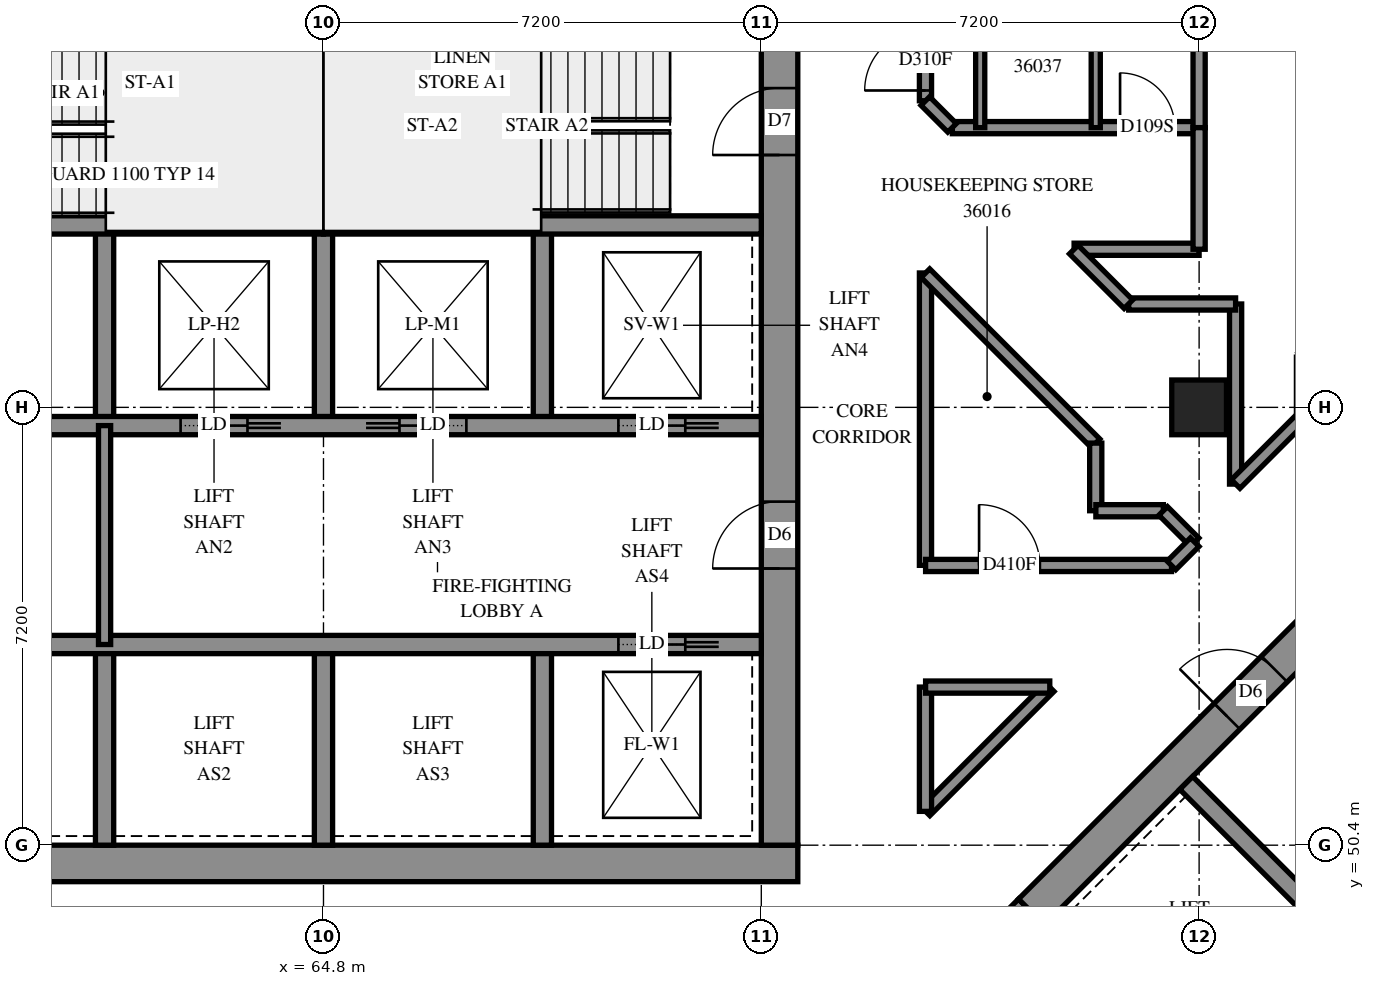
"""IFC4 building model, lengths in metres.
Left out: names, types, materials, properties, quantities, classifications, styles, units other than length and angle.
Written with IfcOpenShell. Run it as: python <this file> out.ifc"""

import sys

from ifc_helpers import new_model, si_unit, direction, frame, frame_2d, origin, origin_2d, place, context, subcontext, project, spatial, rectangle, extrude, element, fill, save


model = new_model("IFC4")
c1 = context("Model", 3, precision=1e-05, world=origin(), true_north=direction((0.0, 1.0)))
c2 = subcontext(c1, "Body", "Model", "MODEL_VIEW")
j1 = project(units=[si_unit("LENGTHUNIT", "METRE"), si_unit("PLANEANGLEUNIT", "RADIAN")], contexts=[c1])
p1 = place(None, origin())
s1 = spatial("IfcSite", under=j1, at=p1, CompositionType="ELEMENT")
p2 = place(p1, origin())
s2 = spatial("IfcBuilding", under=s1, at=p2, CompositionType="ELEMENT")
p3 = place(p2, frame((0.0, 0.0, 135.4)))
s3 = spatial("IfcBuildingStorey", under=s2, at=p3, CompositionType="ELEMENT", Elevation=135.4)
p4 = place(p3, frame((79.2, 57.6, 0.0), z_axis=(0.0, 0.0, 1.0), x_axis=(1.0, 0.0, 0.0)))
e1 = element("IfcColumn", 1, at=p4, inside=s3, PredefinedType="COLUMN", context=c2, shape_type="SweptSolid", body=[
    extrude(rectangle(XDim=0.9, YDim=0.9, at=origin_2d()), origin(), (0.0, 0.0, 1.0), 3.1),
])
p5 = place(p3, frame((57.0, 50.1, -0.3), z_axis=(0.0, 0.0, 1.0), x_axis=(1.0, 0.0, 0.0)))
e2 = element("IfcWall", 2, at=p5, inside=s3, PredefinedType="SHEAR", context=c2, shape_type="SweptSolid", body=[
    extrude(rectangle(XDim=15.6, YDim=0.6, at=frame_2d((7.8, 0.0))), origin(), (0.0, 0.0, 1.0), 2.7),
])
p6 = place(p3, frame((72.3, 50.4, -0.3), z_axis=(0.0, 0.0, 1.0), x_axis=(0.0, 1.0, 0.0)))
e3 = element("IfcWall", 3, at=p6, inside=s3, PredefinedType="SHEAR", context=c2, shape_type="SweptSolid", body=[
    extrude(rectangle(XDim=14.4, YDim=0.6, at=frame_2d((7.2, 0.0))), origin(), (0.0, 0.0, 1.0), 2.7),
])
p7 = place(p6, frame((4.55, 0.0, 0.3)))
e4 = element("IfcOpeningElement", 4, at=p7, cuts=e3, PredefinedType="OPENING", context=c2, shape_type="SweptSolid", body=[
    extrude(rectangle(XDim=1.1, YDim=2.1, at=frame_2d((0.55, 1.05))), frame((0.0, 0.31, 0.0), z_axis=(0.0, -1.0, 0.0), x_axis=(1.0, 0.0, 0.0)), (0.0, 0.0, 1.0), 0.62),
])
p8 = place(p6, frame((11.35, 0.0, 0.3)))
e5 = element("IfcOpeningElement", 5, at=p8, cuts=e3, PredefinedType="OPENING", context=c2, shape_type="SweptSolid", body=[
    extrude(rectangle(XDim=1.1, YDim=2.1, at=frame_2d((0.55, 1.05))), frame((0.0, 0.31, 0.0), z_axis=(0.0, -1.0, 0.0), x_axis=(1.0, 0.0, 0.0)), (0.0, 0.0, 1.0), 0.62),
])
for number, where, z_axis, x_axis in (
    (6, (61.2, 50.4, 0.0), (0.0, 0.0, 1.0), (0.0, 1.0, 0.0)),
    (7, (61.2, 57.3, 0.0), (0.0, 0.0, 1.0), (0.0, 1.0, 0.0)),
    (8, (64.8, 50.4, 0.0), (0.0, 0.0, 1.0), (0.0, 1.0, 0.0)),
    (9, (64.8, 57.3, 0.0), (0.0, 0.0, 1.0), (0.0, 1.0, 0.0)),
    (10, (68.4, 50.4, 0.0), (0.0, 0.0, 1.0), (0.0, 1.0, 0.0)),
    (11, (68.4, 57.3, 0.0), (0.0, 0.0, 1.0), (0.0, 1.0, 0.0)),
):
    element("IfcWall", number, at=place(p3, frame(where, z_axis=z_axis, x_axis=x_axis)), inside=s3, PredefinedType="SOLIDWALL", context=c2, shape_type="SweptSolid", body=[
        extrude(rectangle(XDim=3.3, YDim=0.3, at=frame_2d((1.65, 0.0))), origin(), (0.0, 0.0, 1.0), 3.1),
    ])
p9 = place(p3, frame((57.6, 53.7, 0.0), z_axis=(0.0, 0.0, 1.0), x_axis=(1.0, 0.0, 0.0)))
e12 = element("IfcWall", 12, at=p9, inside=s3, PredefinedType="SOLIDWALL", context=c2, shape_type="SweptSolid", body=[
    extrude(rectangle(XDim=14.4, YDim=0.3, at=frame_2d((7.2, 0.0))), origin(), (0.0, 0.0, 1.0), 3.1),
])
p10 = place(p9, frame((12.05, 0.0, 0.0)))
e13 = element("IfcOpeningElement", 13, at=p10, cuts=e12, PredefinedType="OPENING", context=c2, shape_type="SweptSolid", body=[
    extrude(rectangle(XDim=1.1, YDim=2.1, at=frame_2d((0.55, 1.05))), frame((0.0, 0.16, 0.0), z_axis=(0.0, -1.0, 0.0), x_axis=(1.0, 0.0, 0.0)), (0.0, 0.0, 1.0), 0.32),
])
p11 = place(p3, frame((57.6, 57.3, 0.0), z_axis=(0.0, 0.0, 1.0), x_axis=(1.0, 0.0, 0.0)))
e14 = element("IfcWall", 14, at=p11, inside=s3, PredefinedType="SOLIDWALL", context=c2, shape_type="SweptSolid", body=[
    extrude(rectangle(XDim=14.4, YDim=0.3, at=frame_2d((7.2, 0.0))), origin(), (0.0, 0.0, 1.0), 3.1),
])
p12 = place(p11, frame((1.25, 0.0, 0.0)))
e15 = element("IfcOpeningElement", 15, at=p12, cuts=e14, PredefinedType="OPENING", context=c2, shape_type="SweptSolid", body=[
    extrude(rectangle(XDim=1.1, YDim=2.1, at=frame_2d((0.55, 1.05))), frame((0.0, 0.16, 0.0), z_axis=(0.0, -1.0, 0.0), x_axis=(1.0, 0.0, 0.0)), (0.0, 0.0, 1.0), 0.32),
])
p13 = place(p11, frame((4.85, 0.0, 0.0)))
e16 = element("IfcOpeningElement", 16, at=p13, cuts=e14, PredefinedType="OPENING", context=c2, shape_type="SweptSolid", body=[
    extrude(rectangle(XDim=1.1, YDim=2.1, at=frame_2d((0.55, 1.05))), frame((0.0, 0.16, 0.0), z_axis=(0.0, -1.0, 0.0), x_axis=(1.0, 0.0, 0.0)), (0.0, 0.0, 1.0), 0.32),
])
p14 = place(p11, frame((8.45, 0.0, 0.0)))
e17 = element("IfcOpeningElement", 17, at=p14, cuts=e14, PredefinedType="OPENING", context=c2, shape_type="SweptSolid", body=[
    extrude(rectangle(XDim=1.1, YDim=2.1, at=frame_2d((0.55, 1.05))), frame((0.0, 0.16, 0.0), z_axis=(0.0, -1.0, 0.0), x_axis=(1.0, 0.0, 0.0)), (0.0, 0.0, 1.0), 0.32),
])
p15 = place(p11, frame((12.05, 0.0, 0.0)))
e18 = element("IfcOpeningElement", 18, at=p15, cuts=e14, PredefinedType="OPENING", context=c2, shape_type="SweptSolid", body=[
    extrude(rectangle(XDim=1.1, YDim=2.1, at=frame_2d((0.55, 1.05))), frame((0.0, 0.16, 0.0), z_axis=(0.0, -1.0, 0.0), x_axis=(1.0, 0.0, 0.0)), (0.0, 0.0, 1.0), 0.32),
])
for number, where, z_axis, x_axis in (
    (19, (57.6, 60.6, 0.0), (0.0, 0.0, 1.0), (1.0, 0.0, 0.0)),
    (20, (64.8, 60.6, 0.0), (0.0, 0.0, 1.0), (1.0, 0.0, 0.0)),
):
    element("IfcWall", number, at=place(p3, frame(where, z_axis=z_axis, x_axis=x_axis)), inside=s3, PredefinedType="SOLIDWALL", context=c2, shape_type="SweptSolid", body=[
        extrude(rectangle(XDim=7.2, YDim=0.3, at=frame_2d((3.6, 0.0))), origin(), (0.0, 0.0, 1.0), 3.1),
    ])
p16 = place(p3, frame((64.8, 60.6, 0.0), z_axis=(0.0, 0.0, 1.0), x_axis=(0.0, 1.0, 0.0)))
e21 = element("IfcWall", 21, at=p16, inside=s3, PredefinedType="SOLIDWALL", context=c2, shape_type="SweptSolid", body=[
    extrude(rectangle(XDim=4.2, YDim=0.3, at=frame_2d((2.1, 0.0))), origin(), (0.0, 0.0, 1.0), 3.1),
])
p17 = place(p3, frame((76.018, 49.302, -0.3), z_axis=(0.0, 0.0, 1.0), x_axis=(0.7071067812, -0.7071067812, 0.0)))
e22 = element("IfcWall", 22, at=p17, inside=s3, PredefinedType="SHEAR", context=c2, shape_type="SweptSolid", body=[
    extrude(rectangle(XDim=15.6, YDim=0.6, at=frame_2d((7.8, 0.0))), origin(), (0.0, 0.0, 1.0), 2.7),
])
p18 = place(p3, frame((76.442, 49.302, -0.3), z_axis=(0.0, 0.0, 1.0), x_axis=(0.7071067812, 0.7071067812, 0.0)))
e23 = element("IfcWall", 23, at=p18, inside=s3, PredefinedType="SHEAR", context=c2, shape_type="SweptSolid", body=[
    extrude(rectangle(XDim=14.4, YDim=0.6, at=frame_2d((7.2, 0.0))), origin(), (0.0, 0.0, 1.0), 2.7),
])
p19 = place(p18, frame((4.55, 0.0, 0.3)))
e24 = element("IfcOpeningElement", 24, at=p19, cuts=e23, PredefinedType="OPENING", context=c2, shape_type="SweptSolid", body=[
    extrude(rectangle(XDim=1.1, YDim=2.1, at=frame_2d((0.55, 1.05))), frame((0.0, 0.31, 0.0), z_axis=(0.0, -1.0, 0.0), x_axis=(1.0, 0.0, 0.0)), (0.0, 0.0, 1.0), 0.62),
])
p20 = place(p18, frame((11.35, 0.0, 0.3)))
e25 = element("IfcOpeningElement", 25, at=p20, cuts=e23, PredefinedType="OPENING", context=c2, shape_type="SweptSolid", body=[
    extrude(rectangle(XDim=1.1, YDim=2.1, at=frame_2d((0.55, 1.05))), frame((0.0, 0.31, 0.0), z_axis=(0.0, -1.0, 0.0), x_axis=(1.0, 0.0, 0.0)), (0.0, 0.0, 1.0), 0.62),
])
p21 = place(p3, frame((78.988, 51.423, 0.0), z_axis=(0.0, 0.0, 1.0), x_axis=(0.7071067812, -0.7071067812, 0.0)))
e26 = element("IfcWall", 26, at=p21, inside=s3, PredefinedType="SOLIDWALL", context=c2, shape_type="SweptSolid", body=[
    extrude(rectangle(XDim=14.4, YDim=0.3, at=frame_2d((7.2, 0.0))), origin(), (0.0, 0.0, 1.0), 3.1),
])
p22 = place(p21, frame((12.05, 0.0, 0.0)))
e27 = element("IfcOpeningElement", 27, at=p22, cuts=e26, PredefinedType="OPENING", context=c2, shape_type="SweptSolid", body=[
    extrude(rectangle(XDim=1.1, YDim=2.1, at=frame_2d((0.55, 1.05))), frame((0.0, 0.16, 0.0), z_axis=(0.0, -1.0, 0.0), x_axis=(1.0, 0.0, 0.0)), (0.0, 0.0, 1.0), 0.32),
])
p23 = place(p3, frame((61.2, 53.7, 0.0), z_axis=(0.0, 0.0, 1.0), x_axis=(0.0, 1.0, 0.0)))
e28 = element("IfcWall", 28, at=p23, inside=s3, PredefinedType="PARTITIONING", context=c2, shape_type="SweptSolid", body=[
    extrude(rectangle(XDim=3.6, YDim=0.2, at=frame_2d((1.8, 0.0))), origin(), (0.0, 0.0, 1.0), 3.1),
])
p24 = place(p3, frame((74.7, 62.642, 0.0), z_axis=(0.0, 0.0, 1.0), x_axis=(0.0, 1.0, 0.0)))
e29 = element("IfcWall", 29, at=p24, inside=s3, PredefinedType="PARTITIONING", context=c2, shape_type="SweptSolid", body=[
    extrude(rectangle(XDim=4.858, YDim=0.2, at=frame_2d((2.429, 0.0))), origin(), (0.0, 0.0, 1.0), 3.1),
])
p25 = place(p24, frame((0.169, 0.0, 0.0)))
e30 = element("IfcOpeningElement", 30, at=p25, cuts=e29, PredefinedType="OPENING", context=c2, shape_type="SweptSolid", body=[
    extrude(rectangle(XDim=1.0, YDim=2.1, at=frame_2d((0.5, 1.05))), frame((0.0, 0.11, 0.0), z_axis=(0.0, -1.0, 0.0), x_axis=(1.0, 0.0, 0.0)), (0.0, 0.0, 1.0), 0.22),
])
p26 = place(p3, frame((74.7, 55.002, 0.0), z_axis=(0.0, 0.0, 1.0), x_axis=(0.0, 1.0, 0.0)))
e31 = element("IfcWall", 31, at=p26, inside=s3, PredefinedType="PARTITIONING", context=c2, shape_type="SweptSolid", body=[
    extrude(rectangle(XDim=4.808, YDim=0.2, at=frame_2d((2.404, 0.0))), origin(), (0.0, 0.0, 1.0), 3.1),
])
p27 = place(p3, frame((75.142, 62.2, 0.0), z_axis=(0.0, 0.0, 1.0), x_axis=(1.0, 0.0, 0.0)))
e32 = element("IfcWall", 32, at=p27, inside=s3, PredefinedType="PARTITIONING", context=c2, shape_type="SweptSolid", body=[
    extrude(rectangle(XDim=4.058, YDim=0.2, at=frame_2d((2.029, 0.0))), origin(), (0.0, 0.0, 1.0), 3.1),
])
p28 = place(p27, frame((2.758, 0.0, 0.0)))
e33 = element("IfcOpeningElement", 33, at=p28, cuts=e32, PredefinedType="OPENING", context=c2, shape_type="SweptSolid", body=[
    extrude(rectangle(XDim=0.9, YDim=2.1, at=frame_2d((0.45, 1.05))), frame((0.0, 0.11, 0.0), z_axis=(0.0, -1.0, 0.0), x_axis=(1.0, 0.0, 0.0)), (0.0, 0.0, 1.0), 0.22),
])
p29 = place(p3, frame((74.702, 55.0, 0.0), z_axis=(0.0, 0.0, 1.0), x_axis=(1.0, 0.0, 0.0)))
e34 = element("IfcWall", 34, at=p29, inside=s3, PredefinedType="PARTITIONING", context=c2, shape_type="SweptSolid", body=[
    extrude(rectangle(XDim=4.044, YDim=0.2, at=frame_2d((2.022, 0.0))), origin(), (0.0, 0.0, 1.0), 3.1),
])
p30 = place(p29, frame((0.879, 0.0, 0.0)))
e35 = element("IfcOpeningElement", 35, at=p30, cuts=e34, PredefinedType="OPENING", context=c2, shape_type="SweptSolid", body=[
    extrude(rectangle(XDim=1.0, YDim=2.1, at=frame_2d((0.5, 1.05))), frame((0.0, 0.11, 0.0), z_axis=(0.0, -1.0, 0.0), x_axis=(1.0, 0.0, 0.0)), (0.0, 0.0, 1.0), 0.22),
])
p31 = place(p3, frame((74.699, 59.807, 0.0), z_axis=(0.0, 0.0, 1.0), x_axis=(0.7071067812, -0.7071067812, 0.0)))
e36 = element("IfcWall", 36, at=p31, inside=s3, PredefinedType="PARTITIONING", context=c2, shape_type="SweptSolid", body=[
    extrude(rectangle(XDim=3.957, YDim=0.2, at=frame_2d((1.978, 0.0))), origin(), (0.0, 0.0, 1.0), 3.1),
])
p32 = place(p3, frame((79.8, 56.338, 0.0), z_axis=(0.0, 0.0, 1.0), x_axis=(0.0, 1.0, 0.0)))
e37 = element("IfcWall", 37, at=p32, inside=s3, PredefinedType="PARTITIONING", context=c2, shape_type="SweptSolid", body=[
    extrude(rectangle(XDim=2.962, YDim=0.2, at=frame_2d((1.481, 0.0))), origin(), (0.0, 0.0, 1.0), 3.1),
])
p33 = place(p3, frame((74.701, 50.957, 0.0), z_axis=(0.0, 0.0, 1.0), x_axis=(0.7071067812, 0.7071067812, 0.0)))
e38 = element("IfcWall", 38, at=p33, inside=s3, PredefinedType="PARTITIONING", context=c2, shape_type="SweptSolid", body=[
    extrude(rectangle(XDim=2.888, YDim=0.2, at=frame_2d((1.444, 0.0))), origin(), (0.0, 0.0, 1.0), 3.1),
])
for number, where, z_axis, x_axis in (
    (39, (75.6, 62.2, 0.0), (0.0, 0.0, 1.0), (0.0, 1.0, 0.0)),
    (40, (77.5, 62.2, 0.0), (0.0, 0.0, 1.0), (0.0, 1.0, 0.0)),
):
    element("IfcWall", number, at=place(p3, frame(where, z_axis=z_axis, x_axis=x_axis)), inside=s3, PredefinedType="PARTITIONING", context=c2, shape_type="SweptSolid", body=[
        extrude(rectangle(XDim=2.4, YDim=0.15, at=frame_2d((1.2, 0.0))), origin(), (0.0, 0.0, 1.0), 3.1),
    ])
p34 = place(p3, frame((79.2, 62.2, 0.0), z_axis=(0.0, 0.0, 1.0), x_axis=(0.0, 1.0, 0.0)))
e41 = element("IfcWall", 41, at=p34, inside=s3, PredefinedType="PARTITIONING", context=c2, shape_type="SweptSolid", body=[
    extrude(rectangle(XDim=2.15, YDim=0.2, at=frame_2d((1.075, 0.0))), origin(), (0.0, 0.0, 1.0), 3.1),
])
p35 = place(p3, frame((77.144, 60.2, 0.0), z_axis=(0.0, 0.0, 1.0), x_axis=(1.0, 0.0, 0.0)))
e42 = element("IfcWall", 42, at=p35, inside=s3, PredefinedType="PARTITIONING", context=c2, shape_type="SweptSolid", body=[
    extrude(rectangle(XDim=2.056, YDim=0.2, at=frame_2d((1.028, 0.0))), origin(), (0.0, 0.0, 1.0), 3.1),
])
p36 = place(p3, frame((74.7, 50.956, 0.0), z_axis=(0.0, 0.0, 1.0), x_axis=(0.0, 1.0, 0.0)))
e43 = element("IfcWall", 43, at=p36, inside=s3, PredefinedType="PARTITIONING", context=c2, shape_type="SweptSolid", body=[
    extrude(rectangle(XDim=2.044, YDim=0.2, at=frame_2d((1.022, 0.0))), origin(), (0.0, 0.0, 1.0), 3.1),
])
p37 = place(p3, frame((74.702, 53.0, 0.0), z_axis=(0.0, 0.0, 1.0), x_axis=(1.0, 0.0, 0.0)))
e44 = element("IfcWall", 44, at=p37, inside=s3, PredefinedType="PARTITIONING", context=c2, shape_type="SweptSolid", body=[
    extrude(rectangle(XDim=2.042, YDim=0.2, at=frame_2d((1.021, 0.0))), origin(), (0.0, 0.0, 1.0), 3.1),
])
p38 = place(p3, frame((79.2, 60.2, 0.0), z_axis=(0.0, 0.0, 1.0), x_axis=(0.0, 1.0, 0.0)))
e45 = element("IfcWall", 45, at=p38, inside=s3, PredefinedType="PARTITIONING", context=c2, shape_type="SweptSolid", body=[
    extrude(rectangle(XDim=2.0, YDim=0.2, at=frame_2d((1.0, 0.0))), origin(), (0.0, 0.0, 1.0), 3.1),
])
p39 = place(p3, frame((78.042, 59.3, 0.0), z_axis=(0.0, 0.0, 1.0), x_axis=(1.0, 0.0, 0.0)))
e46 = element("IfcWall", 46, at=p39, inside=s3, PredefinedType="PARTITIONING", context=c2, shape_type="SweptSolid", body=[
    extrude(rectangle(XDim=1.758, YDim=0.2, at=frame_2d((0.879, 0.0))), origin(), (0.0, 0.0, 1.0), 3.1),
])
p40 = place(p3, frame((79.801, 56.339, 0.0), z_axis=(0.0, 0.0, 1.0), x_axis=(0.7071067812, 0.7071067812, 0.0)))
e47 = element("IfcWall", 47, at=p40, inside=s3, PredefinedType="PARTITIONING", context=c2, shape_type="SweptSolid", body=[
    extrude(rectangle(XDim=1.553, YDim=0.2, at=frame_2d((0.776, 0.0))), origin(), (0.0, 0.0, 1.0), 3.1),
])
p41 = place(p3, frame((77.139, 60.195, 0.0), z_axis=(0.0, 0.0, 1.0), x_axis=(0.7071067812, -0.7071067812, 0.0)))
e48 = element("IfcWall", 48, at=p41, inside=s3, PredefinedType="PARTITIONING", context=c2, shape_type="SweptSolid", body=[
    extrude(rectangle(XDim=1.27, YDim=0.2, at=frame_2d((0.635, 0.0))), origin(), (0.0, 0.0, 1.0), 3.1),
])
p42 = place(p3, frame((77.5, 55.9, 0.0), z_axis=(0.0, 0.0, 1.0), x_axis=(0.0, 1.0, 0.0)))
e49 = element("IfcWall", 49, at=p42, inside=s3, PredefinedType="PARTITIONING", context=c2, shape_type="SweptSolid", body=[
    extrude(rectangle(XDim=1.112, YDim=0.2, at=frame_2d((0.556, 0.0))), origin(), (0.0, 0.0, 1.0), 3.1),
])
p43 = place(p3, frame((77.502, 55.9, 0.0), z_axis=(0.0, 0.0, 1.0), x_axis=(1.0, 0.0, 0.0)))
e50 = element("IfcWall", 50, at=p43, inside=s3, PredefinedType="PARTITIONING", context=c2, shape_type="SweptSolid", body=[
    extrude(rectangle(XDim=1.11, YDim=0.2, at=frame_2d((0.555, 0.0))), origin(), (0.0, 0.0, 1.0), 3.1),
])
p44 = place(p3, frame((78.609, 55.897, 0.0), z_axis=(0.0, 0.0, 1.0), x_axis=(0.7071067812, -0.7071067812, 0.0)))
e51 = element("IfcWall", 51, at=p44, inside=s3, PredefinedType="PARTITIONING", context=c2, shape_type="SweptSolid", body=[
    extrude(rectangle(XDim=0.73, YDim=0.2, at=frame_2d((0.365, 0.0))), origin(), (0.0, 0.0, 1.0), 3.1),
])
p45 = place(p3, frame((74.697, 62.637, 0.0), z_axis=(0.0, 0.0, 1.0), x_axis=(0.7071067812, -0.7071067812, 0.0)))
e52 = element("IfcWall", 52, at=p45, inside=s3, PredefinedType="PARTITIONING", context=c2, shape_type="SweptSolid", body=[
    extrude(rectangle(XDim=0.622, YDim=0.2, at=frame_2d((0.311, 0.0))), origin(), (0.0, 0.0, 1.0), 3.1),
])
p46 = place(p3, frame((78.745, 55.001, 0.0), z_axis=(0.0, 0.0, 1.0), x_axis=(0.7071067812, 0.7071067812, 0.0)))
e53 = element("IfcWall", 53, at=p46, inside=s3, PredefinedType="PARTITIONING", context=c2, shape_type="SweptSolid", body=[
    extrude(rectangle(XDim=0.54, YDim=0.2, at=frame_2d((0.27, 0.0))), origin(), (0.0, 0.0, 1.0), 3.1),
])
p47 = place(p7, origin())
e54 = element("IfcDoor", 54, at=p47, inside=s3, OperationType="DOUBLE_DOOR_SINGLE_SWING", PredefinedType="DOOR", context=c2, shape_type="SweptSolid", body=[
    extrude(rectangle(XDim=1.1, YDim=2.1, at=frame_2d((0.55, 1.05))), frame((0.0, 0.025, 0.0), z_axis=(0.0, -1.0, 0.0), x_axis=(1.0, 0.0, 0.0)), (0.0, 0.0, 1.0), 0.05),
])
fill(e4, e54)
p48 = place(p8, origin())
e55 = element("IfcDoor", 55, at=p48, inside=s3, OperationType="SINGLE_SWING_RIGHT", PredefinedType="DOOR", context=c2, shape_type="SweptSolid", body=[
    extrude(rectangle(XDim=1.1, YDim=2.1, at=frame_2d((0.55, 1.05))), frame((0.0, 0.025, 0.0), z_axis=(0.0, -1.0, 0.0), x_axis=(1.0, 0.0, 0.0)), (0.0, 0.0, 1.0), 0.05),
])
fill(e5, e55)
p49 = place(p10, origin())
e56 = element("IfcDoor", 56, at=p49, inside=s3, OperationType="SLIDING_TO_RIGHT", PredefinedType="DOOR", context=c2, shape_type="SweptSolid", body=[
    extrude(rectangle(XDim=1.1, YDim=2.1, at=frame_2d((0.55, 1.05))), frame((0.0, 0.025, 0.0), z_axis=(0.0, -1.0, 0.0), x_axis=(1.0, 0.0, 0.0)), (0.0, 0.0, 1.0), 0.05),
])
fill(e13, e56)
p50 = place(p13, origin())
e57 = element("IfcDoor", 57, at=p50, inside=s3, OperationType="SLIDING_TO_RIGHT", PredefinedType="DOOR", context=c2, shape_type="SweptSolid", body=[
    extrude(rectangle(XDim=1.1, YDim=2.1, at=frame_2d((0.55, 1.05))), frame((0.0, 0.025, 0.0), z_axis=(0.0, -1.0, 0.0), x_axis=(1.0, 0.0, 0.0)), (0.0, 0.0, 1.0), 0.05),
])
fill(e16, e57)
p51 = place(p14, origin())
e58 = element("IfcDoor", 58, at=p51, inside=s3, OperationType="SLIDING_TO_LEFT", PredefinedType="DOOR", context=c2, shape_type="SweptSolid", body=[
    extrude(rectangle(XDim=1.1, YDim=2.1, at=frame_2d((0.55, 1.05))), frame((0.0, 0.025, 0.0), z_axis=(0.0, -1.0, 0.0), x_axis=(1.0, 0.0, 0.0)), (0.0, 0.0, 1.0), 0.05),
])
fill(e17, e58)
p52 = place(p15, origin())
e59 = element("IfcDoor", 59, at=p52, inside=s3, OperationType="SLIDING_TO_RIGHT", PredefinedType="DOOR", context=c2, shape_type="SweptSolid", body=[
    extrude(rectangle(XDim=1.1, YDim=2.1, at=frame_2d((0.55, 1.05))), frame((0.0, 0.025, 0.0), z_axis=(0.0, -1.0, 0.0), x_axis=(1.0, 0.0, 0.0)), (0.0, 0.0, 1.0), 0.05),
])
fill(e18, e59)
p53 = place(p19, origin())
e60 = element("IfcDoor", 60, at=p53, inside=s3, OperationType="DOUBLE_DOOR_SINGLE_SWING", PredefinedType="DOOR", context=c2, shape_type="SweptSolid", body=[
    extrude(rectangle(XDim=1.1, YDim=2.1, at=frame_2d((0.55, 1.05))), frame((0.0, 0.025, 0.0), z_axis=(0.0, -1.0, 0.0), x_axis=(1.0, 0.0, 0.0)), (0.0, 0.0, 1.0), 0.05),
])
fill(e24, e60)
p54 = place(p30, origin())
e61 = element("IfcDoor", 61, at=p54, inside=s3, OperationType="SINGLE_SWING_LEFT", PredefinedType="DOOR", context=c2, shape_type="SweptSolid", body=[
    extrude(rectangle(XDim=1.0, YDim=2.1, at=frame_2d((0.5, 1.05))), frame((0.0, 0.025, 0.0), z_axis=(0.0, -1.0, 0.0), x_axis=(1.0, 0.0, 0.0)), (0.0, 0.0, 1.0), 0.05),
])
fill(e35, e61)
p55 = place(p25, origin())
e62 = element("IfcDoor", 62, at=p55, inside=s3, OperationType="SINGLE_SWING_RIGHT", PredefinedType="DOOR", context=c2, shape_type="SweptSolid", body=[
    extrude(rectangle(XDim=1.0, YDim=2.1, at=frame_2d((0.5, 1.05))), frame((0.0, 0.025, 0.0), z_axis=(0.0, -1.0, 0.0), x_axis=(1.0, 0.0, 0.0)), (0.0, 0.0, 1.0), 0.05),
])
fill(e30, e62)
p56 = place(p28, origin())
e63 = element("IfcDoor", 63, at=p56, inside=s3, OperationType="SINGLE_SWING_LEFT", PredefinedType="DOOR", context=c2, shape_type="SweptSolid", body=[
    extrude(rectangle(XDim=0.9, YDim=2.1, at=frame_2d((0.45, 1.05))), frame((0.0, 0.025, 0.0), z_axis=(0.0, -1.0, 0.0), x_axis=(1.0, 0.0, 0.0)), (0.0, 0.0, 1.0), 0.05),
])
fill(e33, e63)
save(model, sys.argv[1])
